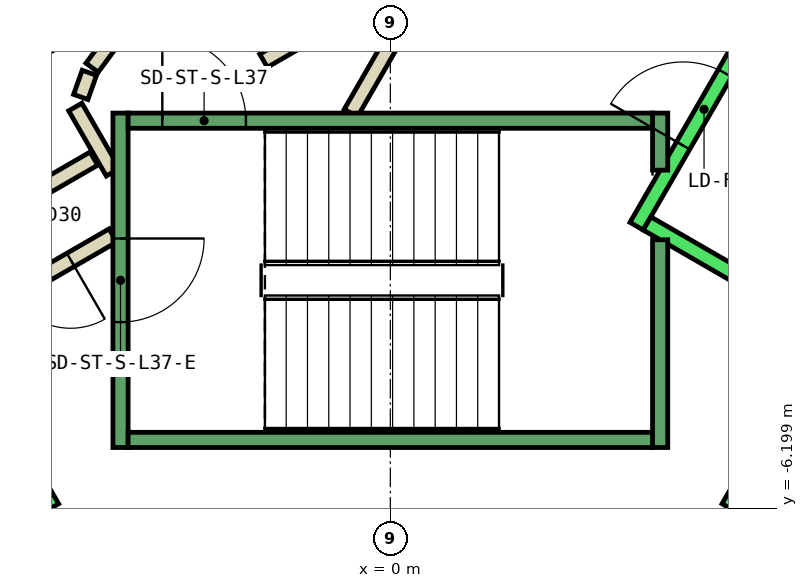
"""IFC4 building model, lengths in metres.
Left out: names, types, materials, properties, quantities, classifications, styles, units other than length and angle.
Written with IfcOpenShell. Run it as: python <this file> out.ifc"""

import sys

from ifc_helpers import new_model, si_unit, direction, frame, frame_2d, origin, place, context, subcontext, project, spatial, rectangle, extrude, element, fill, save


model = new_model("IFC4")
c1 = context("Model", 3, precision=1e-05, world=origin(), true_north=direction((0.0, 1.0)))
c2 = subcontext(c1, "Body", "Model", "MODEL_VIEW")
j1 = project(units=[si_unit("LENGTHUNIT", "METRE"), si_unit("PLANEANGLEUNIT", "RADIAN")], contexts=[c1])
p1 = place(None, origin())
s1 = spatial("IfcSite", under=j1, at=p1, CompositionType="ELEMENT")
p2 = place(p1, origin())
s2 = spatial("IfcBuilding", under=s1, at=p2, CompositionType="ELEMENT")
p3 = place(p2, frame((0.0, 0.0, 167.6)))
s3 = spatial("IfcBuildingStorey", under=s2, at=p3, CompositionType="ELEMENT", Elevation=167.6)
p4 = place(p3, frame((-3.9, -1.599, 0.0), z_axis=(0.0, 0.0, 1.0), x_axis=(-0.865969445389, -0.500096910261, 0.0)))
e1 = element("IfcWall", 1, at=p4, inside=s3, PredefinedType="PARTITIONING", context=c2, shape_type="SweptSolid", body=[
    extrude(rectangle(XDim=1.373, YDim=0.2, at=frame_2d((0.687, 0.0))), origin(), (0.0, 0.0, 1.0), 3.8),
])
p5 = place(p3, frame((-3.65, -2.61, 0.0), z_axis=(0.0, 0.0, 1.0), x_axis=(-0.866072462134, -0.499918483688, 0.0)))
e2 = element("IfcWall", 2, at=p5, inside=s3, PredefinedType="PARTITIONING", context=c2, shape_type="SweptSolid", body=[
    extrude(rectangle(XDim=2.084, YDim=0.2, at=frame_2d((1.042, 0.0))), origin(), (0.0, 0.0, 1.0), 3.8),
])
p6 = place(p5, frame((0.642, 0.0, 0.0)))
e3 = element("IfcOpeningElement", 3, at=p6, cuts=e2, PredefinedType="OPENING", context=c2, shape_type="SweptSolid", body=[
    extrude(rectangle(XDim=0.9, YDim=2.1, at=frame_2d((0.45, 1.05))), frame((0.0, 0.11, 0.0), z_axis=(0.0, -1.0, 0.0), x_axis=(1.0, 0.0, 0.0)), (0.0, 0.0, 1.0), 0.22),
])
p7 = place(p3, frame((-4.145, -0.92, 0.0), z_axis=(0.0, 0.0, 1.0), x_axis=(0.499743786207, -0.866173278362, 0.0)))
e4 = element("IfcWall", 4, at=p7, inside=s3, PredefinedType="PARTITIONING", context=c2, shape_type="SweptSolid", body=[
    extrude(rectangle(XDim=0.991, YDim=0.2, at=frame_2d((0.495, 0.0))), origin(), (0.0, 0.0, 1.0), 3.8),
])
p8 = place(p3, frame((-0.52, -1.0, 0.0), z_axis=(0.0, 0.0, 1.0), x_axis=(0.50011622646, 0.865958290007, 0.0)))
e5 = element("IfcWall", 5, at=p8, inside=s3, PredefinedType="PARTITIONING", context=c2, shape_type="SweptSolid", body=[
    extrude(rectangle(XDim=4.991, YDim=0.2, at=frame_2d((2.496, 0.0))), origin(), (0.0, 0.0, 1.0), 3.8),
])
p9 = place(p8, frame((1.945, 0.0, 0.0)))
e6 = element("IfcOpeningElement", 6, at=p9, cuts=e5, PredefinedType="OPENING", context=c2, shape_type="SweptSolid", body=[
    extrude(rectangle(XDim=1.0, YDim=2.1, at=frame_2d((0.5, 1.05))), frame((0.0, 0.11, 0.0), z_axis=(0.0, -1.0, 0.0), x_axis=(1.0, 0.0, 0.0)), (0.0, 0.0, 1.0), 0.22),
])
p10 = place(p3, frame((-0.412, 0.414, 0.0), z_axis=(0.0, 0.0, 1.0), x_axis=(-0.866017369001, -0.500013916395, 0.0)))
e7 = element("IfcWall", 7, at=p10, inside=s3, PredefinedType="PARTITIONING", context=c2, shape_type="SweptSolid", body=[
    extrude(rectangle(XDim=1.45, YDim=0.2, at=frame_2d((0.725, 0.0))), origin(), (0.0, 0.0, 1.0), 3.8),
])
p11 = place(p3, frame((-3.723, -0.131, 0.0), z_axis=(0.0, 0.0, 1.0), x_axis=(-0.594675113454, -0.803966112121, 0.0)))
e8 = element("IfcWall", 8, at=p11, inside=s3, PredefinedType="PARTITIONING", context=c2, shape_type="SweptSolid", body=[
    extrude(rectangle(XDim=0.338, YDim=0.2, at=frame_2d((0.169, 0.0))), origin(), (0.0, 0.0, 1.0), 3.8),
])
p12 = place(p3, frame((-3.96, -0.47, 0.0), z_axis=(0.0, 0.0, 1.0), x_axis=(-0.334824194261, -0.942280615813, 0.0)))
e9 = element("IfcWall", 9, at=p12, inside=s3, PredefinedType="PARTITIONING", context=c2, shape_type="SweptSolid", body=[
    extrude(rectangle(XDim=0.338, YDim=0.2, at=frame_2d((0.169, 0.0))), origin(), (0.0, 0.0, 1.0), 3.8),
])
p13 = place(p3, frame((-9.751, 2.99, 0.0), z_axis=(0.0, 0.0, 1.0), x_axis=(0.50000090737, -0.866024879913, 0.0)))
e10 = element("IfcWall", 10, at=p13, inside=s3, PredefinedType="STANDARD", context=c2, shape_type="SweptSolid", body=[
    extrude(rectangle(XDim=10.6, YDim=0.2, at=frame_2d((5.3, 0.0))), origin(), (0.0, 0.0, 1.0), 3.8),
])
p14 = place(p3, frame((3.24, -2.488, 0.0), z_axis=(0.0, 0.0, 1.0), x_axis=(0.49994636267, 0.866056369097, 0.0)))
e11 = element("IfcWall", 11, at=p14, inside=s3, PredefinedType="STANDARD", context=c2, shape_type="SweptSolid", body=[
    extrude(rectangle(XDim=2.8, YDim=0.2, at=frame_2d((1.4, 0.0))), origin(), (0.0, 0.0, 1.0), 3.8),
])
p15 = place(p14, frame((1.225, 0.0, 0.0)))
e12 = element("IfcOpeningElement", 12, at=p15, cuts=e11, PredefinedType="OPENING", context=c2, shape_type="SweptSolid", body=[
    extrude(rectangle(XDim=1.1, YDim=2.1, at=frame_2d((0.55, 1.05))), frame((0.0, 0.11, 0.0), z_axis=(0.0, -1.0, 0.0), x_axis=(1.0, 0.0, 0.0)), (0.0, 0.0, 1.0), 0.22),
])
p16 = place(p3, frame((3.377, -2.452, 0.0), z_axis=(0.0, 0.0, 1.0), x_axis=(0.865955154139, -0.50012165622, 0.0)))
e13 = element("IfcWall", 13, at=p16, inside=s3, PredefinedType="STANDARD", context=c2, shape_type="SweptSolid", body=[
    extrude(rectangle(XDim=2.4, YDim=0.2, at=frame_2d((1.2, 0.0))), origin(), (0.0, 0.0, 1.0), 3.8),
])
p17 = place(p3, frame((4.451, -6.19, 0.0), z_axis=(0.0, 0.0, 1.0), x_axis=(0.50000090737, 0.866024879913, 0.0)))
e14 = element("IfcWall", 14, at=p17, inside=s3, PredefinedType="STANDARD", context=c2, shape_type="SweptSolid", body=[
    extrude(rectangle(XDim=10.6, YDim=0.2, at=frame_2d((5.3, 0.0))), origin(), (0.0, 0.0, 1.0), 3.8),
])
p18 = place(p3, frame((-3.55, -1.0, 0.0), z_axis=(0.0, 0.0, 1.0), x_axis=(0.0, -1.0, 0.0)))
e15 = element("IfcWall", 15, at=p18, inside=s3, PredefinedType="STANDARD", context=c2, shape_type="SweptSolid", body=[
    extrude(rectangle(XDim=4.4, YDim=0.2, at=frame_2d((2.2, 0.0))), origin(), (0.0, 0.0, 1.0), 3.8),
])
p19 = place(p18, frame((1.65, 0.0, 0.0)))
e16 = element("IfcOpeningElement", 16, at=p19, cuts=e15, PredefinedType="OPENING", context=c2, shape_type="SweptSolid", body=[
    extrude(rectangle(XDim=1.1, YDim=2.2, at=frame_2d((0.55, 1.1))), frame((0.0, 0.11, 0.0), z_axis=(0.0, -1.0, 0.0), x_axis=(1.0, 0.0, 0.0)), (0.0, 0.0, 1.0), 0.22),
])
p20 = place(p3, frame((3.55, -2.667, 0.0), z_axis=(0.0, 0.0, 1.0), x_axis=(0.0, -1.0, 0.0)))
e17 = element("IfcWall", 17, at=p20, inside=s3, PredefinedType="STANDARD", context=c2, shape_type="SweptSolid", body=[
    extrude(rectangle(XDim=2.733, YDim=0.2, at=frame_2d((1.366, 0.0))), origin(), (0.0, 0.0, 1.0), 3.8),
])
p21 = place(p3, frame((3.55, -1.0, 0.0), z_axis=(0.0, 0.0, 1.0), x_axis=(0.0, -1.0, 0.0)))
e18 = element("IfcWall", 18, at=p21, inside=s3, PredefinedType="STANDARD", context=c2, shape_type="SweptSolid", body=[
    extrude(rectangle(XDim=0.751, YDim=0.2, at=frame_2d((0.375, 0.0))), origin(), (0.0, 0.0, 1.0), 3.8),
])
p22 = place(p3, frame((-3.45, -1.1, 0.0), z_axis=(0.0, 0.0, 1.0), x_axis=(1.0, 0.0, 0.0)))
e19 = element("IfcWall", 19, at=p22, inside=s3, PredefinedType="STANDARD", context=c2, shape_type="SweptSolid", body=[
    extrude(rectangle(XDim=6.9, YDim=0.2, at=frame_2d((3.45, 0.0))), origin(), (0.0, 0.0, 1.0), 3.8),
])
p23 = place(p22, frame((0.45, 0.0, 0.0)))
e20 = element("IfcOpeningElement", 20, at=p23, cuts=e19, PredefinedType="OPENING", context=c2, shape_type="SweptSolid", body=[
    extrude(rectangle(XDim=1.1, YDim=2.2, at=frame_2d((0.55, 1.1))), frame((0.0, 0.11, 0.0), z_axis=(0.0, -1.0, 0.0), x_axis=(1.0, 0.0, 0.0)), (0.0, 0.0, 1.0), 0.22),
])
p24 = place(p3, frame((-3.45, -5.3, 0.0), z_axis=(0.0, 0.0, 1.0), x_axis=(1.0, 0.0, 0.0)))
e21 = element("IfcWall", 21, at=p24, inside=s3, PredefinedType="STANDARD", context=c2, shape_type="SweptSolid", body=[
    extrude(rectangle(XDim=6.9, YDim=0.2, at=frame_2d((3.45, 0.0))), origin(), (0.0, 0.0, 1.0), 3.8),
])
p25 = place(p6, origin())
e22 = element("IfcDoor", 22, at=p25, inside=s3, OperationType="SINGLE_SWING_LEFT", PredefinedType="DOOR", context=c2, shape_type="SweptSolid", body=[
    extrude(rectangle(XDim=0.9, YDim=2.1, at=frame_2d((0.45, 1.05))), frame((0.0, 0.025, 0.0), z_axis=(0.0, -1.0, 0.0), x_axis=(1.0, 0.0, 0.0)), (0.0, 0.0, 1.0), 0.05),
])
fill(e3, e22)
p26 = place(p15, origin())
e23 = element("IfcDoor", 23, at=p26, inside=s3, OperationType="SLIDING_TO_LEFT", PredefinedType="DOOR", context=c2, shape_type="SweptSolid", body=[
    extrude(rectangle(XDim=1.1, YDim=2.1, at=frame_2d((0.55, 1.05))), frame((0.0, 0.025, 0.0), z_axis=(0.0, -1.0, 0.0), x_axis=(1.0, 0.0, 0.0)), (0.0, 0.0, 1.0), 0.05),
])
fill(e12, e23)
p27 = place(p23, origin())
e24 = element("IfcDoor", 24, at=p27, inside=s3, OperationType="SINGLE_SWING_LEFT", PredefinedType="DOOR", context=c2, shape_type="SweptSolid", body=[
    extrude(rectangle(XDim=1.1, YDim=2.2, at=frame_2d((0.55, 1.1))), frame((0.0, 0.025, 0.0), z_axis=(0.0, -1.0, 0.0), x_axis=(1.0, 0.0, 0.0)), (0.0, 0.0, 1.0), 0.05),
])
fill(e20, e24)
p28 = place(p19, origin())
e25 = element("IfcDoor", 25, at=p28, inside=s3, OperationType="SINGLE_SWING_LEFT", PredefinedType="DOOR", context=c2, shape_type="SweptSolid", body=[
    extrude(rectangle(XDim=1.1, YDim=2.2, at=frame_2d((0.55, 1.1))), frame((0.0, 0.025, 0.0), z_axis=(0.0, -1.0, 0.0), x_axis=(1.0, 0.0, 0.0)), (0.0, 0.0, 1.0), 0.05),
])
fill(e16, e25)
save(model, sys.argv[1])
